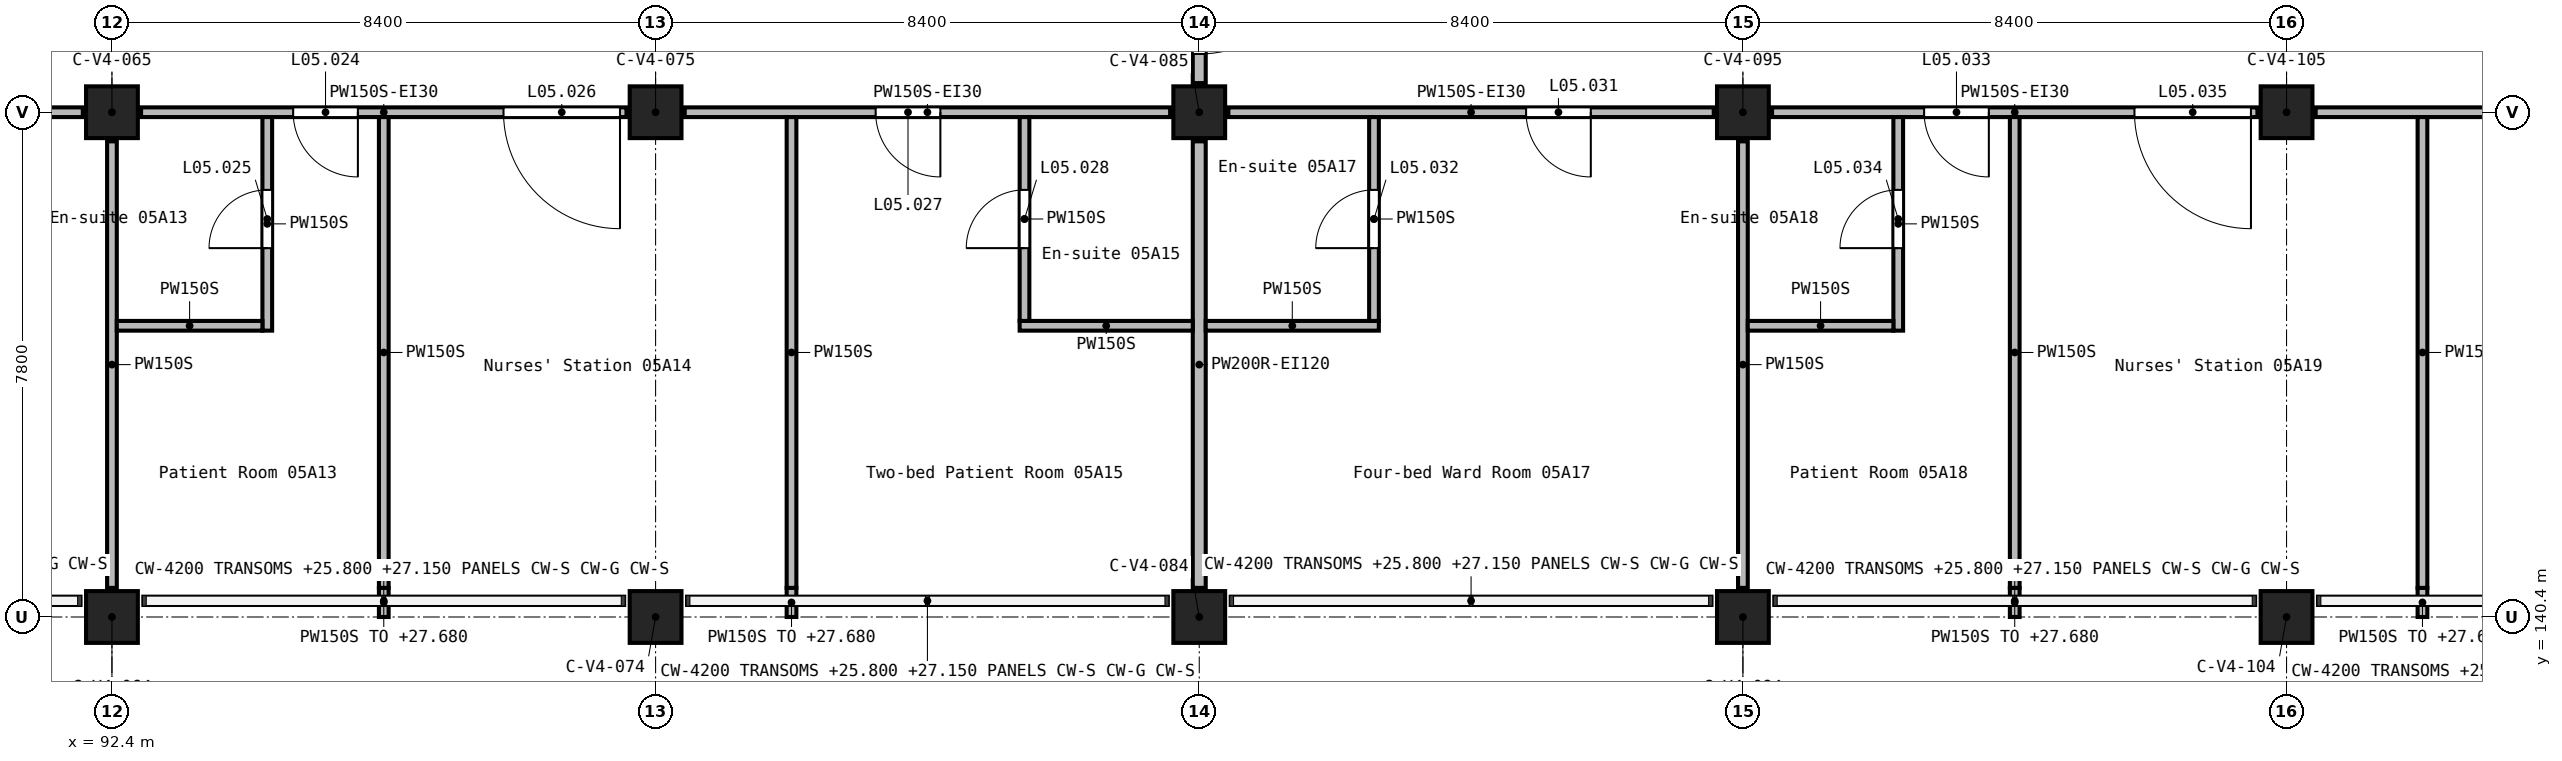
"""IFC4 building model, lengths in metres.
Left out: names, types, materials, properties, quantities, classifications, styles, units other than length and angle.
Written with IfcOpenShell. Run it as: python <this file> out.ifc"""

import sys

from ifc_helpers import new_model, si_unit, direction, frame, frame_2d, origin, origin_2d, place, context, subcontext, project, spatial, rectangle, extrude, element, fill, save


model = new_model("IFC4")
c1 = context("Model", 3, precision=1e-05, world=origin(), true_north=direction((0.0, 1.0)))
c2 = subcontext(c1, "Body", "Model", "MODEL_VIEW")
j1 = project(units=[si_unit("LENGTHUNIT", "METRE"), si_unit("PLANEANGLEUNIT", "RADIAN")], contexts=[c1])
p1 = place(None, origin())
s1 = spatial("IfcSite", under=j1, at=p1, CompositionType="ELEMENT")
p2 = place(p1, origin())
s2 = spatial("IfcBuilding", under=s1, at=p2, CompositionType="ELEMENT")
p3 = place(p2, frame((0.0, 0.0, 24.9)))
s3 = spatial("IfcBuildingStorey", under=s2, at=p3, CompositionType="ELEMENT", Elevation=24.9)
for number, where, z_axis, x_axis in (
    (1, (92.4, 140.4, 0.0), (0.0, 0.0, 1.0), (1.0, 0.0, 0.0)),
    (2, (92.4, 148.2, 0.0), (0.0, 0.0, 1.0), (1.0, 0.0, 0.0)),
    (3, (100.8, 140.4, 0.0), (0.0, 0.0, 1.0), (1.0, 0.0, 0.0)),
    (4, (100.8, 148.2, 0.0), (0.0, 0.0, 1.0), (1.0, 0.0, 0.0)),
    (5, (109.2, 140.4, 0.0), (0.0, 0.0, 1.0), (1.0, 0.0, 0.0)),
    (6, (109.2, 148.2, 0.0), (0.0, 0.0, 1.0), (1.0, 0.0, 0.0)),
    (7, (117.6, 140.4, 0.0), (0.0, 0.0, 1.0), (1.0, 0.0, 0.0)),
    (8, (117.6, 148.2, 0.0), (0.0, 0.0, 1.0), (1.0, 0.0, 0.0)),
    (9, (126.0, 140.4, 0.0), (0.0, 0.0, 1.0), (1.0, 0.0, 0.0)),
    (10, (126.0, 148.2, 0.0), (0.0, 0.0, 1.0), (1.0, 0.0, 0.0)),
):
    element("IfcColumn", number, at=place(p3, frame(where, z_axis=z_axis, x_axis=x_axis)), inside=s3, PredefinedType="COLUMN", context=c2, shape_type="SweptSolid", body=[
        extrude(rectangle(XDim=0.8, YDim=0.8, at=origin_2d()), origin(), (0.0, 0.0, 1.0), 3.9),
    ])
p4 = place(p3, frame((109.2, 151.35, 0.0), z_axis=(0.0, 0.0, 1.0), x_axis=(0.0, -1.0, 0.0)))
e11 = element("IfcWall", 11, at=p4, inside=s3, PredefinedType="SOLIDWALL", context=c2, shape_type="SweptSolid", body=[
    extrude(rectangle(XDim=2.7, YDim=0.2, at=frame_2d((1.35, 0.0))), origin(), (0.0, 0.0, 1.0), 3.6),
])
p5 = place(p4, frame((0.45, 0.0, 0.0)))
e12 = element("IfcOpeningElement", 12, at=p5, cuts=e11, PredefinedType="OPENING", context=c2, shape_type="SweptSolid", body=[
    extrude(rectangle(XDim=1.8, YDim=2.1, at=frame_2d((0.9, 1.05))), frame((0.0, 0.11, 0.0), z_axis=(0.0, -1.0, 0.0), x_axis=(1.0, 0.0, 0.0)), (0.0, 0.0, 1.0), 0.22),
])
p6 = place(p3, frame((109.2, 147.75, 0.0), z_axis=(0.0, 0.0, 1.0), x_axis=(0.0, -1.0, 0.0)))
e13 = element("IfcWall", 13, at=p6, inside=s3, PredefinedType="SOLIDWALL", context=c2, shape_type="SweptSolid", body=[
    extrude(rectangle(XDim=6.9, YDim=0.2, at=frame_2d((3.45, 0.0))), origin(), (0.0, 0.0, 1.0), 3.6),
])
p7 = place(p3, frame((133.95, 148.2, 0.0), z_axis=(0.0, 0.0, 1.0), x_axis=(-1.0, 0.0, 0.0)))
e14 = element("IfcWall", 14, at=p7, inside=s3, PredefinedType="PARTITIONING", context=c2, shape_type="SweptSolid", body=[
    extrude(rectangle(XDim=7.5, YDim=0.15, at=frame_2d((3.75, 0.0))), origin(), (0.0, 0.0, 1.0), 3.6),
])
p8 = place(p7, frame((3.55, 0.0, 0.0)))
e15 = element("IfcOpeningElement", 15, at=p8, cuts=e14, PredefinedType="OPENING", context=c2, shape_type="SweptSolid", body=[
    extrude(rectangle(XDim=1.0, YDim=2.1, at=frame_2d((0.5, 1.05))), frame((0.0, 0.085, 0.0), z_axis=(0.0, -1.0, 0.0), x_axis=(1.0, 0.0, 0.0)), (0.0, 0.0, 1.0), 0.17),
])
p9 = place(p3, frame((125.55, 148.2, 0.0), z_axis=(0.0, 0.0, 1.0), x_axis=(-1.0, 0.0, 0.0)))
e16 = element("IfcWall", 16, at=p9, inside=s3, PredefinedType="PARTITIONING", context=c2, shape_type="SweptSolid", body=[
    extrude(rectangle(XDim=7.5, YDim=0.15, at=frame_2d((3.75, 0.0))), origin(), (0.0, 0.0, 1.0), 3.6),
])
p10 = place(p9, frame((4.15, 0.0, 0.0)))
e17 = element("IfcOpeningElement", 17, at=p10, cuts=e16, PredefinedType="OPENING", context=c2, shape_type="SweptSolid", body=[
    extrude(rectangle(XDim=1.0, YDim=2.1, at=frame_2d((0.5, 1.05))), frame((0.0, 0.085, 0.0), z_axis=(0.0, -1.0, 0.0), x_axis=(1.0, 0.0, 0.0)), (0.0, 0.0, 1.0), 0.17),
])
p11 = place(p9, frame((0.1, 0.0, 0.0)))
e18 = element("IfcOpeningElement", 18, at=p11, cuts=e16, PredefinedType="OPENING", context=c2, shape_type="SweptSolid", body=[
    extrude(rectangle(XDim=1.8, YDim=2.1, at=frame_2d((0.9, 1.05))), frame((0.0, 0.085, 0.0), z_axis=(0.0, -1.0, 0.0), x_axis=(1.0, 0.0, 0.0)), (0.0, 0.0, 1.0), 0.17),
])
p12 = place(p3, frame((117.15, 148.2, 0.0), z_axis=(0.0, 0.0, 1.0), x_axis=(-1.0, 0.0, 0.0)))
e19 = element("IfcWall", 19, at=p12, inside=s3, PredefinedType="PARTITIONING", context=c2, shape_type="SweptSolid", body=[
    extrude(rectangle(XDim=7.5, YDim=0.15, at=frame_2d((3.75, 0.0))), origin(), (0.0, 0.0, 1.0), 3.6),
])
p13 = place(p12, frame((1.9, 0.0, 0.0)))
e20 = element("IfcOpeningElement", 20, at=p13, cuts=e19, PredefinedType="OPENING", context=c2, shape_type="SweptSolid", body=[
    extrude(rectangle(XDim=1.0, YDim=2.1, at=frame_2d((0.5, 1.05))), frame((0.0, 0.085, 0.0), z_axis=(0.0, -1.0, 0.0), x_axis=(1.0, 0.0, 0.0)), (0.0, 0.0, 1.0), 0.17),
])
p14 = place(p3, frame((108.75, 148.2, 0.0), z_axis=(0.0, 0.0, 1.0), x_axis=(-1.0, 0.0, 0.0)))
e21 = element("IfcWall", 21, at=p14, inside=s3, PredefinedType="PARTITIONING", context=c2, shape_type="SweptSolid", body=[
    extrude(rectangle(XDim=7.5, YDim=0.15, at=frame_2d((3.75, 0.0))), origin(), (0.0, 0.0, 1.0), 3.6),
])
p15 = place(p14, frame((3.55, 0.0, 0.0)))
e22 = element("IfcOpeningElement", 22, at=p15, cuts=e21, PredefinedType="OPENING", context=c2, shape_type="SweptSolid", body=[
    extrude(rectangle(XDim=1.0, YDim=2.1, at=frame_2d((0.5, 1.05))), frame((0.0, 0.085, 0.0), z_axis=(0.0, -1.0, 0.0), x_axis=(1.0, 0.0, 0.0)), (0.0, 0.0, 1.0), 0.17),
])
p16 = place(p3, frame((100.35, 148.2, 0.0), z_axis=(0.0, 0.0, 1.0), x_axis=(-1.0, 0.0, 0.0)))
e23 = element("IfcWall", 23, at=p16, inside=s3, PredefinedType="PARTITIONING", context=c2, shape_type="SweptSolid", body=[
    extrude(rectangle(XDim=7.5, YDim=0.15, at=frame_2d((3.75, 0.0))), origin(), (0.0, 0.0, 1.0), 3.6),
])
p17 = place(p16, frame((4.15, 0.0, 0.0)))
e24 = element("IfcOpeningElement", 24, at=p17, cuts=e23, PredefinedType="OPENING", context=c2, shape_type="SweptSolid", body=[
    extrude(rectangle(XDim=1.0, YDim=2.1, at=frame_2d((0.5, 1.05))), frame((0.0, 0.085, 0.0), z_axis=(0.0, -1.0, 0.0), x_axis=(1.0, 0.0, 0.0)), (0.0, 0.0, 1.0), 0.17),
])
p18 = place(p16, frame((0.1, 0.0, 0.0)))
e25 = element("IfcOpeningElement", 25, at=p18, cuts=e23, PredefinedType="OPENING", context=c2, shape_type="SweptSolid", body=[
    extrude(rectangle(XDim=1.8, YDim=2.1, at=frame_2d((0.9, 1.05))), frame((0.0, 0.085, 0.0), z_axis=(0.0, -1.0, 0.0), x_axis=(1.0, 0.0, 0.0)), (0.0, 0.0, 1.0), 0.17),
])
p19 = place(p3, frame((91.95, 148.2, 0.0), z_axis=(0.0, 0.0, 1.0), x_axis=(-1.0, 0.0, 0.0)))
e26 = element("IfcWall", 26, at=p19, inside=s3, PredefinedType="PARTITIONING", context=c2, shape_type="SweptSolid", body=[
    extrude(rectangle(XDim=7.5, YDim=0.15, at=frame_2d((3.75, 0.0))), origin(), (0.0, 0.0, 1.0), 3.6),
])
p20 = place(p19, frame((1.9, 0.0, 0.0)))
e27 = element("IfcOpeningElement", 27, at=p20, cuts=e26, PredefinedType="OPENING", context=c2, shape_type="SweptSolid", body=[
    extrude(rectangle(XDim=1.0, YDim=2.1, at=frame_2d((0.5, 1.05))), frame((0.0, 0.085, 0.0), z_axis=(0.0, -1.0, 0.0), x_axis=(1.0, 0.0, 0.0)), (0.0, 0.0, 1.0), 0.17),
])
p21 = place(p3, frame((92.4, 140.85, 0.0), z_axis=(0.0, 0.0, 1.0), x_axis=(0.0, 1.0, 0.0)))
e28 = element("IfcWall", 28, at=p21, inside=s3, PredefinedType="PARTITIONING", context=c2, shape_type="SweptSolid", body=[
    extrude(rectangle(XDim=6.9, YDim=0.15, at=frame_2d((3.45, 0.0))), origin(), (0.0, 0.0, 1.0), 3.6),
])
p22 = place(p3, frame((96.6, 140.4, 0.0), z_axis=(0.0, 0.0, 1.0), x_axis=(0.0, 1.0, 0.0)))
e29 = element("IfcWall", 29, at=p22, inside=s3, PredefinedType="PARTITIONING", context=c2, shape_type="SweptSolid", body=[
    extrude(rectangle(XDim=0.45, YDim=0.15, at=frame_2d((0.225, 0.0))), origin(), (0.0, 0.0, 1.0), 2.78),
])
p23 = place(p3, frame((96.6, 140.85, 0.0), z_axis=(0.0, 0.0, 1.0), x_axis=(0.0, 1.0, 0.0)))
e30 = element("IfcWall", 30, at=p23, inside=s3, PredefinedType="PARTITIONING", context=c2, shape_type="SweptSolid", body=[
    extrude(rectangle(XDim=7.275, YDim=0.15, at=frame_2d((3.637, 0.0))), origin(), (0.0, 0.0, 1.0), 3.6),
])
p24 = place(p3, frame((102.9, 140.4, 0.0), z_axis=(0.0, 0.0, 1.0), x_axis=(0.0, 1.0, 0.0)))
e31 = element("IfcWall", 31, at=p24, inside=s3, PredefinedType="PARTITIONING", context=c2, shape_type="SweptSolid", body=[
    extrude(rectangle(XDim=0.45, YDim=0.15, at=frame_2d((0.225, 0.0))), origin(), (0.0, 0.0, 1.0), 2.78),
])
p25 = place(p3, frame((102.9, 140.85, 0.0), z_axis=(0.0, 0.0, 1.0), x_axis=(0.0, 1.0, 0.0)))
e32 = element("IfcWall", 32, at=p25, inside=s3, PredefinedType="PARTITIONING", context=c2, shape_type="SweptSolid", body=[
    extrude(rectangle(XDim=7.275, YDim=0.15, at=frame_2d((3.637, 0.0))), origin(), (0.0, 0.0, 1.0), 3.6),
])
p26 = place(p3, frame((117.6, 140.85, 0.0), z_axis=(0.0, 0.0, 1.0), x_axis=(0.0, 1.0, 0.0)))
e33 = element("IfcWall", 33, at=p26, inside=s3, PredefinedType="PARTITIONING", context=c2, shape_type="SweptSolid", body=[
    extrude(rectangle(XDim=6.9, YDim=0.15, at=frame_2d((3.45, 0.0))), origin(), (0.0, 0.0, 1.0), 3.6),
])
p27 = place(p3, frame((121.8, 140.4, 0.0), z_axis=(0.0, 0.0, 1.0), x_axis=(0.0, 1.0, 0.0)))
e34 = element("IfcWall", 34, at=p27, inside=s3, PredefinedType="PARTITIONING", context=c2, shape_type="SweptSolid", body=[
    extrude(rectangle(XDim=0.45, YDim=0.15, at=frame_2d((0.225, 0.0))), origin(), (0.0, 0.0, 1.0), 2.78),
])
p28 = place(p3, frame((121.8, 140.85, 0.0), z_axis=(0.0, 0.0, 1.0), x_axis=(0.0, 1.0, 0.0)))
e35 = element("IfcWall", 35, at=p28, inside=s3, PredefinedType="PARTITIONING", context=c2, shape_type="SweptSolid", body=[
    extrude(rectangle(XDim=7.275, YDim=0.15, at=frame_2d((3.637, 0.0))), origin(), (0.0, 0.0, 1.0), 3.6),
])
p29 = place(p3, frame((128.1, 140.4, 0.0), z_axis=(0.0, 0.0, 1.0), x_axis=(0.0, 1.0, 0.0)))
e36 = element("IfcWall", 36, at=p29, inside=s3, PredefinedType="PARTITIONING", context=c2, shape_type="SweptSolid", body=[
    extrude(rectangle(XDim=0.45, YDim=0.15, at=frame_2d((0.225, 0.0))), origin(), (0.0, 0.0, 1.0), 2.78),
])
p30 = place(p3, frame((128.1, 140.85, 0.0), z_axis=(0.0, 0.0, 1.0), x_axis=(0.0, 1.0, 0.0)))
e37 = element("IfcWall", 37, at=p30, inside=s3, PredefinedType="PARTITIONING", context=c2, shape_type="SweptSolid", body=[
    extrude(rectangle(XDim=7.275, YDim=0.15, at=frame_2d((3.637, 0.0))), origin(), (0.0, 0.0, 1.0), 3.6),
])
for number, where, z_axis, x_axis in (
    (38, (106.425, 144.9, 0.0), (0.0, 0.0, 1.0), (1.0, 0.0, 0.0)),
    (39, (109.3, 144.9, 0.0), (0.0, 0.0, 1.0), (1.0, 0.0, 0.0)),
):
    element("IfcWall", number, at=place(p3, frame(where, z_axis=z_axis, x_axis=x_axis)), inside=s3, PredefinedType="PARTITIONING", context=c2, shape_type="SweptSolid", body=[
        extrude(rectangle(XDim=2.675, YDim=0.15, at=frame_2d((1.337, 0.0))), origin(), (0.0, 0.0, 1.0), 3.6),
    ])
p31 = place(p3, frame((94.8, 144.825, 0.0), z_axis=(0.0, 0.0, 1.0), x_axis=(0.0, 1.0, 0.0)))
e40 = element("IfcWall", 40, at=p31, inside=s3, PredefinedType="PARTITIONING", context=c2, shape_type="SweptSolid", body=[
    extrude(rectangle(XDim=3.3, YDim=0.15, at=frame_2d((1.65, 0.0))), origin(), (0.0, 0.0, 1.0), 3.6),
])
p32 = place(p31, frame((1.275, 0.0, 0.0)))
e41 = element("IfcOpeningElement", 41, at=p32, cuts=e40, PredefinedType="OPENING", context=c2, shape_type="SweptSolid", body=[
    extrude(rectangle(XDim=0.9, YDim=2.1, at=frame_2d((0.45, 1.05))), frame((0.0, 0.085, 0.0), z_axis=(0.0, -1.0, 0.0), x_axis=(1.0, 0.0, 0.0)), (0.0, 0.0, 1.0), 0.17),
])
p33 = place(p3, frame((106.5, 144.975, 0.0), z_axis=(0.0, 0.0, 1.0), x_axis=(0.0, 1.0, 0.0)))
e42 = element("IfcWall", 42, at=p33, inside=s3, PredefinedType="PARTITIONING", context=c2, shape_type="SweptSolid", body=[
    extrude(rectangle(XDim=3.15, YDim=0.15, at=frame_2d((1.575, 0.0))), origin(), (0.0, 0.0, 1.0), 3.6),
])
p34 = place(p33, frame((1.125, 0.0, 0.0)))
e43 = element("IfcOpeningElement", 43, at=p34, cuts=e42, PredefinedType="OPENING", context=c2, shape_type="SweptSolid", body=[
    extrude(rectangle(XDim=0.9, YDim=2.1, at=frame_2d((0.45, 1.05))), frame((0.0, 0.085, 0.0), z_axis=(0.0, -1.0, 0.0), x_axis=(1.0, 0.0, 0.0)), (0.0, 0.0, 1.0), 0.17),
])
p35 = place(p3, frame((111.9, 144.975, 0.0), z_axis=(0.0, 0.0, 1.0), x_axis=(0.0, 1.0, 0.0)))
e44 = element("IfcWall", 44, at=p35, inside=s3, PredefinedType="PARTITIONING", context=c2, shape_type="SweptSolid", body=[
    extrude(rectangle(XDim=3.15, YDim=0.15, at=frame_2d((1.575, 0.0))), origin(), (0.0, 0.0, 1.0), 3.6),
])
p36 = place(p35, frame((1.125, 0.0, 0.0)))
e45 = element("IfcOpeningElement", 45, at=p36, cuts=e44, PredefinedType="OPENING", context=c2, shape_type="SweptSolid", body=[
    extrude(rectangle(XDim=0.9, YDim=2.1, at=frame_2d((0.45, 1.05))), frame((0.0, 0.085, 0.0), z_axis=(0.0, -1.0, 0.0), x_axis=(1.0, 0.0, 0.0)), (0.0, 0.0, 1.0), 0.17),
])
p37 = place(p3, frame((120.0, 144.825, 0.0), z_axis=(0.0, 0.0, 1.0), x_axis=(0.0, 1.0, 0.0)))
e46 = element("IfcWall", 46, at=p37, inside=s3, PredefinedType="PARTITIONING", context=c2, shape_type="SweptSolid", body=[
    extrude(rectangle(XDim=3.3, YDim=0.15, at=frame_2d((1.65, 0.0))), origin(), (0.0, 0.0, 1.0), 3.6),
])
p38 = place(p37, frame((1.275, 0.0, 0.0)))
e47 = element("IfcOpeningElement", 47, at=p38, cuts=e46, PredefinedType="OPENING", context=c2, shape_type="SweptSolid", body=[
    extrude(rectangle(XDim=0.9, YDim=2.1, at=frame_2d((0.45, 1.05))), frame((0.0, 0.085, 0.0), z_axis=(0.0, -1.0, 0.0), x_axis=(1.0, 0.0, 0.0)), (0.0, 0.0, 1.0), 0.17),
])
for number, where, z_axis, x_axis in (
    (48, (117.675, 144.9, 0.0), (0.0, 0.0, 1.0), (1.0, 0.0, 0.0)),
    (49, (92.475, 144.9, 0.0), (0.0, 0.0, 1.0), (1.0, 0.0, 0.0)),
):
    element("IfcWall", number, at=place(p3, frame(where, z_axis=z_axis, x_axis=x_axis)), inside=s3, PredefinedType="PARTITIONING", context=c2, shape_type="SweptSolid", body=[
        extrude(rectangle(XDim=2.25, YDim=0.15, at=frame_2d((1.125, 0.0))), origin(), (0.0, 0.0, 1.0), 3.6),
    ])
p39 = place(p5, origin())
e50 = element("IfcDoor", 50, at=p39, inside=s3, OperationType="DOUBLE_DOOR_SINGLE_SWING", PredefinedType="DOOR", context=c2, shape_type="SweptSolid", body=[
    extrude(rectangle(XDim=1.8, YDim=2.1, at=frame_2d((0.9, 1.05))), frame((0.0, 0.025, 0.0), z_axis=(0.0, -1.0, 0.0), x_axis=(1.0, 0.0, 0.0)), (0.0, 0.0, 1.0), 0.05),
])
fill(e12, e50)
p40 = place(p17, origin())
e51 = element("IfcDoor", 51, at=p40, inside=s3, OperationType="SINGLE_SWING_RIGHT", PredefinedType="DOOR", context=c2, shape_type="SweptSolid", body=[
    extrude(rectangle(XDim=1.0, YDim=2.1, at=frame_2d((0.5, 1.05))), frame((0.0, 0.025, 0.0), z_axis=(0.0, -1.0, 0.0), x_axis=(1.0, 0.0, 0.0)), (0.0, 0.0, 1.0), 0.05),
])
fill(e24, e51)
p41 = place(p32, origin())
e52 = element("IfcDoor", 52, at=p41, inside=s3, OperationType="SINGLE_SWING_RIGHT", PredefinedType="DOOR", context=c2, shape_type="SweptSolid", body=[
    extrude(rectangle(XDim=0.9, YDim=2.1, at=frame_2d((0.45, 1.05))), frame((0.0, 0.025, 0.0), z_axis=(0.0, -1.0, 0.0), x_axis=(1.0, 0.0, 0.0)), (0.0, 0.0, 1.0), 0.05),
])
fill(e41, e52)
p42 = place(p18, origin())
e53 = element("IfcDoor", 53, at=p42, inside=s3, OperationType="DOUBLE_DOOR_SINGLE_SWING", PredefinedType="DOOR", context=c2, shape_type="SweptSolid", body=[
    extrude(rectangle(XDim=1.8, YDim=2.1, at=frame_2d((0.9, 1.05))), frame((0.0, 0.025, 0.0), z_axis=(0.0, -1.0, 0.0), x_axis=(1.0, 0.0, 0.0)), (0.0, 0.0, 1.0), 0.05),
])
fill(e25, e53)
p43 = place(p15, origin())
e54 = element("IfcDoor", 54, at=p43, inside=s3, OperationType="SINGLE_SWING_RIGHT", PredefinedType="DOOR", context=c2, shape_type="SweptSolid", body=[
    extrude(rectangle(XDim=1.0, YDim=2.1, at=frame_2d((0.5, 1.05))), frame((0.0, 0.025, 0.0), z_axis=(0.0, -1.0, 0.0), x_axis=(1.0, 0.0, 0.0)), (0.0, 0.0, 1.0), 0.05),
])
fill(e22, e54)
p44 = place(p34, frame((0.9, 0.0, 0.0), z_axis=(0.0, 0.0, 1.0), x_axis=(-1.0, 0.0, 0.0)))
e55 = element("IfcDoor", 55, at=p44, inside=s3, OperationType="SINGLE_SWING_LEFT", PredefinedType="DOOR", context=c2, shape_type="SweptSolid", body=[
    extrude(rectangle(XDim=0.9, YDim=2.1, at=frame_2d((0.45, 1.05))), frame((0.0, 0.025, 0.0), z_axis=(0.0, -1.0, 0.0), x_axis=(1.0, 0.0, 0.0)), (0.0, 0.0, 1.0), 0.05),
])
fill(e43, e55)
p45 = place(p13, origin())
e56 = element("IfcDoor", 56, at=p45, inside=s3, OperationType="SINGLE_SWING_LEFT", PredefinedType="DOOR", context=c2, shape_type="SweptSolid", body=[
    extrude(rectangle(XDim=1.0, YDim=2.1, at=frame_2d((0.5, 1.05))), frame((0.0, 0.025, 0.0), z_axis=(0.0, -1.0, 0.0), x_axis=(1.0, 0.0, 0.0)), (0.0, 0.0, 1.0), 0.05),
])
fill(e20, e56)
p46 = place(p36, origin())
e57 = element("IfcDoor", 57, at=p46, inside=s3, OperationType="SINGLE_SWING_RIGHT", PredefinedType="DOOR", context=c2, shape_type="SweptSolid", body=[
    extrude(rectangle(XDim=0.9, YDim=2.1, at=frame_2d((0.45, 1.05))), frame((0.0, 0.025, 0.0), z_axis=(0.0, -1.0, 0.0), x_axis=(1.0, 0.0, 0.0)), (0.0, 0.0, 1.0), 0.05),
])
fill(e45, e57)
p47 = place(p10, origin())
e58 = element("IfcDoor", 58, at=p47, inside=s3, OperationType="SINGLE_SWING_RIGHT", PredefinedType="DOOR", context=c2, shape_type="SweptSolid", body=[
    extrude(rectangle(XDim=1.0, YDim=2.1, at=frame_2d((0.5, 1.05))), frame((0.0, 0.025, 0.0), z_axis=(0.0, -1.0, 0.0), x_axis=(1.0, 0.0, 0.0)), (0.0, 0.0, 1.0), 0.05),
])
fill(e17, e58)
p48 = place(p38, origin())
e59 = element("IfcDoor", 59, at=p48, inside=s3, OperationType="SINGLE_SWING_RIGHT", PredefinedType="DOOR", context=c2, shape_type="SweptSolid", body=[
    extrude(rectangle(XDim=0.9, YDim=2.1, at=frame_2d((0.45, 1.05))), frame((0.0, 0.025, 0.0), z_axis=(0.0, -1.0, 0.0), x_axis=(1.0, 0.0, 0.0)), (0.0, 0.0, 1.0), 0.05),
])
fill(e47, e59)
p49 = place(p11, origin())
e60 = element("IfcDoor", 60, at=p49, inside=s3, OperationType="DOUBLE_DOOR_SINGLE_SWING", PredefinedType="DOOR", context=c2, shape_type="SweptSolid", body=[
    extrude(rectangle(XDim=1.8, YDim=2.1, at=frame_2d((0.9, 1.05))), frame((0.0, 0.025, 0.0), z_axis=(0.0, -1.0, 0.0), x_axis=(1.0, 0.0, 0.0)), (0.0, 0.0, 1.0), 0.05),
])
fill(e18, e60)
save(model, sys.argv[1])
